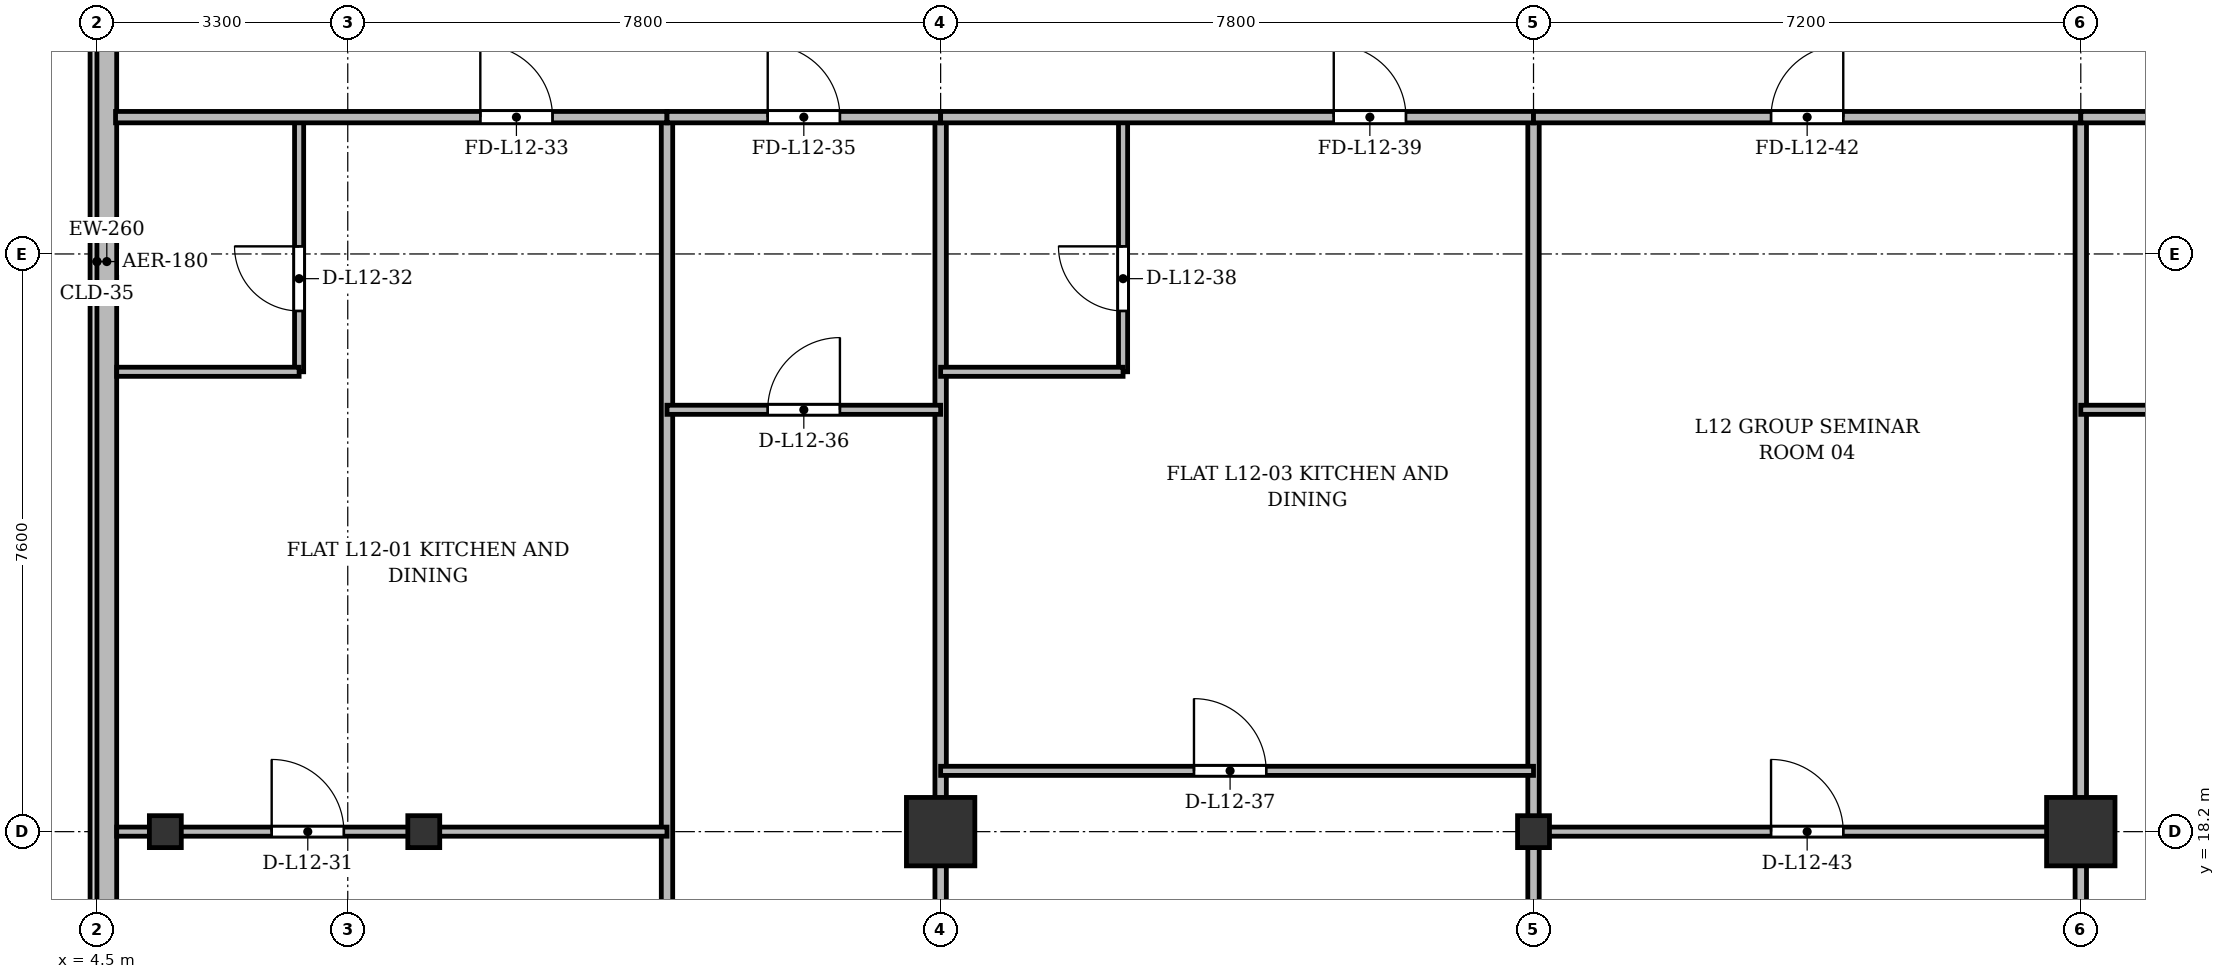
"""IFC4 building model, lengths in metres.
Left out: names, types, materials, properties, quantities, classifications, styles, units other than length and angle.
Written with IfcOpenShell. Run it as: python <this file> out.ifc"""

import sys

from ifc_helpers import new_model, si_unit, direction, frame, frame_2d, origin, origin_2d, place, context, subcontext, project, spatial, rectangle, i_section, extrude, source, transform, mapped, element, fill, save


model = new_model("IFC4")
c1 = context("Model", 3, precision=1e-05, world=origin(), true_north=direction((0.0, 1.0)))
c2 = subcontext(c1, "Body", "Model", "MODEL_VIEW")
j1 = project(units=[si_unit("LENGTHUNIT", "METRE"), si_unit("PLANEANGLEUNIT", "RADIAN")], contexts=[c1])
p1 = place(None, origin())
s1 = spatial("IfcSite", under=j1, at=p1, CompositionType="ELEMENT")
p2 = place(p1, origin())
s2 = spatial("IfcBuilding", under=s1, at=p2, CompositionType="ELEMENT")
p3 = place(p2, frame((0.0, 0.0, 48.7)))
s3 = spatial("IfcBuildingStorey", under=s2, at=p3, CompositionType="ELEMENT", Elevation=48.7)
m1 = source(origin(), c2, "Body", "SweptSolid", [
    extrude(i_section(OverallWidth=0.42, OverallDepth=0.42, WebThickness=0.026, FlangeThickness=0.04, at=origin_2d()), origin(), (0.0, 0.0, 1.0), 3.6),
])
for number, where, z_axis, x_axis in (
    (1, (5.4, 18.2, 0.0), (0.0, 0.0, 1.0), (1.0, 0.0, 0.0)),
    (2, (8.8, 18.2, 0.0), (0.0, 0.0, 1.0), (1.0, 0.0, 0.0)),
):
    element("IfcColumn", number, at=place(p3, frame(where, z_axis=z_axis, x_axis=x_axis)), inside=s3, PredefinedType="COLUMN", context=c2, shape_type="MappedRepresentation", body=[
        mapped(m1, transform((0.0, 0.0, 0.0), x_axis=(1.0, 0.0, 0.0), y_axis=(0.0, 1.0, 0.0), z_axis=(0.0, 0.0, 1.0), scale=1.0)),
    ])
m2 = source(origin(), c2, "Body", "SweptSolid", [
    extrude(rectangle(XDim=0.9, YDim=0.9, at=origin_2d()), origin(), (0.0, 0.0, 1.0), 3.6),
])
p4 = place(p3, frame((15.6, 18.2, 0.0), z_axis=(0.0, 0.0, 1.0), x_axis=(1.0, 0.0, 0.0)))
e3 = element("IfcColumn", 3, at=p4, inside=s3, PredefinedType="COLUMN", context=c2, shape_type="MappedRepresentation", body=[
    mapped(m2, transform((0.0, 0.0, 0.0), x_axis=(1.0, 0.0, 0.0), y_axis=(0.0, 1.0, 0.0), z_axis=(0.0, 0.0, 1.0), scale=1.0)),
])
p5 = place(p3, frame((23.4, 18.2, 0.0), z_axis=(0.0, 0.0, 1.0), x_axis=(1.0, 0.0, 0.0)))
e4 = element("IfcColumn", 4, at=p5, inside=s3, PredefinedType="COLUMN", context=c2, shape_type="MappedRepresentation", body=[
    mapped(m1, transform((0.0, 0.0, 0.0), x_axis=(1.0, 0.0, 0.0), y_axis=(0.0, 1.0, 0.0), z_axis=(0.0, 0.0, 1.0), scale=1.0)),
])
p6 = place(p3, frame((30.6, 18.2, 0.0), z_axis=(0.0, 0.0, 1.0), x_axis=(1.0, 0.0, 0.0)))
e5 = element("IfcColumn", 5, at=p6, inside=s3, PredefinedType="COLUMN", context=c2, shape_type="MappedRepresentation", body=[
    mapped(m2, transform((0.0, 0.0, 0.0), x_axis=(1.0, 0.0, 0.0), y_axis=(0.0, 1.0, 0.0), z_axis=(0.0, 0.0, 1.0), scale=1.0)),
])
p7 = place(p3, frame((4.63, 5.9, 0.0), z_axis=(0.0, 0.0, 1.0), x_axis=(0.0, 1.0, 0.0)))
e6 = element("IfcWall", 6, at=p7, inside=s3, PredefinedType="SOLIDWALL", context=c2, shape_type="SweptSolid", body=[
    extrude(rectangle(XDim=39.6, YDim=0.26, at=frame_2d((19.8, 0.0))), origin(), (0.0, 0.0, 1.0), 3.34),
])
p8 = place(p7, frame((1.45, 0.0, 0.92)))
e7 = element("IfcOpeningElement", 7, at=p8, cuts=e6, PredefinedType="OPENING", context=c2, shape_type="SweptSolid", body=[
    extrude(rectangle(XDim=1.2, YDim=1.65, at=frame_2d((0.6, 0.825))), frame((0.0, 0.14, 0.0), z_axis=(0.0, -1.0, 0.0), x_axis=(1.0, 0.0, 0.0)), (0.0, 0.0, 1.0), 0.28),
])
p9 = place(p7, frame((4.2, 0.0, 0.92)))
e8 = element("IfcOpeningElement", 8, at=p9, cuts=e6, PredefinedType="OPENING", context=c2, shape_type="SweptSolid", body=[
    extrude(rectangle(XDim=2.6, YDim=1.9, at=frame_2d((1.3, 0.95))), frame((0.0, 0.14, 0.0), z_axis=(0.0, -1.0, 0.0), x_axis=(1.0, 0.0, 0.0)), (0.0, 0.0, 1.0), 0.28),
])
p10 = place(p7, frame((8.4, 0.0, 0.92)))
e9 = element("IfcOpeningElement", 9, at=p10, cuts=e6, PredefinedType="OPENING", context=c2, shape_type="SweptSolid", body=[
    extrude(rectangle(XDim=2.6, YDim=1.9, at=frame_2d((1.3, 0.95))), frame((0.0, 0.14, 0.0), z_axis=(0.0, -1.0, 0.0), x_axis=(1.0, 0.0, 0.0)), (0.0, 0.0, 1.0), 0.28),
])
p11 = place(p7, frame((29.6, 0.0, 0.92)))
e10 = element("IfcOpeningElement", 10, at=p11, cuts=e6, PredefinedType="OPENING", context=c2, shape_type="SweptSolid", body=[
    extrude(rectangle(XDim=2.6, YDim=1.9, at=frame_2d((1.3, 0.95))), frame((0.0, 0.14, 0.0), z_axis=(0.0, -1.0, 0.0), x_axis=(1.0, 0.0, 0.0)), (0.0, 0.0, 1.0), 0.28),
])
p12 = place(p7, frame((33.9, 0.0, 0.92)))
e11 = element("IfcOpeningElement", 11, at=p12, cuts=e6, PredefinedType="OPENING", context=c2, shape_type="SweptSolid", body=[
    extrude(rectangle(XDim=1.2, YDim=1.65, at=frame_2d((0.6, 0.825))), frame((0.0, 0.14, 0.0), z_axis=(0.0, -1.0, 0.0), x_axis=(1.0, 0.0, 0.0)), (0.0, 0.0, 1.0), 0.28),
])
p13 = place(p7, frame((37.25, 0.0, 0.92)))
e12 = element("IfcOpeningElement", 12, at=p13, cuts=e6, PredefinedType="OPENING", context=c2, shape_type="SweptSolid", body=[
    extrude(rectangle(XDim=1.2, YDim=1.65, at=frame_2d((0.6, 0.825))), frame((0.0, 0.14, 0.0), z_axis=(0.0, -1.0, 0.0), x_axis=(1.0, 0.0, 0.0)), (0.0, 0.0, 1.0), 0.28),
])
p14 = place(p3, frame((12.0, 3.145, 0.0), z_axis=(0.0, 0.0, 1.0), x_axis=(0.0, 1.0, 0.0)))
e13 = element("IfcWall", 13, at=p14, inside=s3, PredefinedType="PARTITIONING", context=c2, shape_type="SweptSolid", body=[
    extrude(rectangle(XDim=24.455, YDim=0.15, at=frame_2d((12.228, 0.0))), origin(), (0.0, 0.0, 1.0), 2.69),
])
for number, where, z_axis, x_axis in (
    (14, (15.6, 3.145, 0.0), (0.0, 0.0, 1.0), (0.0, 1.0, 0.0)),
    (15, (23.4, 3.145, 0.0), (0.0, 0.0, 1.0), (0.0, 1.0, 0.0)),
    (16, (30.6, 3.145, 0.0), (0.0, 0.0, 1.0), (0.0, 1.0, 0.0)),
):
    element("IfcWall", number, at=place(p3, frame(where, z_axis=z_axis, x_axis=x_axis)), inside=s3, PredefinedType="PARTITIONING", context=c2, shape_type="SweptSolid", body=[
        extrude(rectangle(XDim=24.455, YDim=0.15, at=frame_2d((12.228, 0.0))), origin(), (0.0, 0.0, 1.0), 2.752),
    ])
p15 = place(p3, frame((4.76, 18.2, 0.0), z_axis=(0.0, 0.0, 1.0), x_axis=(1.0, 0.0, 0.0)))
e17 = element("IfcWall", 17, at=p15, inside=s3, PredefinedType="PARTITIONING", context=c2, shape_type="SweptSolid", body=[
    extrude(rectangle(XDim=7.24, YDim=0.12, at=frame_2d((3.62, 0.0))), origin(), (0.0, 0.0, 1.0), 2.69),
])
p16 = place(p15, frame((2.039, 0.0, 0.0)))
e18 = element("IfcOpeningElement", 18, at=p16, cuts=e17, PredefinedType="OPENING", context=c2, shape_type="SweptSolid", body=[
    extrude(rectangle(XDim=0.95, YDim=2.15, at=frame_2d((0.475, 1.075))), frame((0.0, 0.07, 0.0), z_axis=(0.0, -1.0, 0.0), x_axis=(1.0, 0.0, 0.0)), (0.0, 0.0, 1.0), 0.14),
])
p17 = place(p3, frame((7.16, 24.25, 0.0), z_axis=(0.0, 0.0, 1.0), x_axis=(0.0, 1.0, 0.0)))
e19 = element("IfcWall", 19, at=p17, inside=s3, PredefinedType="PARTITIONING", context=c2, shape_type="SweptSolid", body=[
    extrude(rectangle(XDim=3.35, YDim=0.12, at=frame_2d((1.675, 0.0))), origin(), (0.0, 0.0, 1.0), 2.94),
])
p18 = place(p17, frame((0.8, 0.0, 0.0)))
e20 = element("IfcOpeningElement", 20, at=p18, cuts=e19, PredefinedType="OPENING", context=c2, shape_type="SweptSolid", body=[
    extrude(rectangle(XDim=0.85, YDim=2.1, at=frame_2d((0.425, 1.05))), frame((0.0, 0.07, 0.0), z_axis=(0.0, -1.0, 0.0), x_axis=(1.0, 0.0, 0.0)), (0.0, 0.0, 1.0), 0.14),
])
p19 = place(p3, frame((4.76, 24.25, 0.0), z_axis=(0.0, 0.0, 1.0), x_axis=(1.0, 0.0, 0.0)))
e21 = element("IfcWall", 21, at=p19, inside=s3, PredefinedType="PARTITIONING", context=c2, shape_type="SweptSolid", body=[
    extrude(rectangle(XDim=2.4, YDim=0.12, at=frame_2d((1.2, 0.0))), origin(), (0.0, 0.0, 1.0), 2.752),
])
p20 = place(p3, frame((4.745, 27.6, 0.0), z_axis=(0.0, 0.0, 1.0), x_axis=(1.0, 0.0, 0.0)))
e22 = element("IfcWall", 22, at=p20, inside=s3, PredefinedType="PARTITIONING", context=c2, shape_type="SweptSolid", body=[
    extrude(rectangle(XDim=7.255, YDim=0.15, at=frame_2d((3.627, 0.0))), origin(), (0.0, 0.0, 1.0), 2.752),
])
p21 = place(p20, frame((4.799, 0.0, 0.0)))
e23 = element("IfcOpeningElement", 23, at=p21, cuts=e22, PredefinedType="OPENING", context=c2, shape_type="SweptSolid", body=[
    extrude(rectangle(XDim=0.95, YDim=2.15, at=frame_2d((0.475, 1.075))), frame((0.0, 0.085, 0.0), z_axis=(0.0, -1.0, 0.0), x_axis=(1.0, 0.0, 0.0)), (0.0, 0.0, 1.0), 0.17),
])
p22 = place(p3, frame((12.0, 27.6, 0.0), z_axis=(0.0, 0.0, 1.0), x_axis=(1.0, 0.0, 0.0)))
e24 = element("IfcWall", 24, at=p22, inside=s3, PredefinedType="PARTITIONING", context=c2, shape_type="SweptSolid", body=[
    extrude(rectangle(XDim=3.6, YDim=0.15, at=frame_2d((1.8, 0.0))), origin(), (0.0, 0.0, 1.0), 2.752),
])
p23 = place(p22, frame((1.325, 0.0, 0.0)))
e25 = element("IfcOpeningElement", 25, at=p23, cuts=e24, PredefinedType="OPENING", context=c2, shape_type="SweptSolid", body=[
    extrude(rectangle(XDim=0.95, YDim=2.15, at=frame_2d((0.475, 1.075))), frame((0.0, 0.085, 0.0), z_axis=(0.0, -1.0, 0.0), x_axis=(1.0, 0.0, 0.0)), (0.0, 0.0, 1.0), 0.17),
])
p24 = place(p3, frame((12.0, 23.75, 0.0), z_axis=(0.0, 0.0, 1.0), x_axis=(1.0, 0.0, 0.0)))
e26 = element("IfcWall", 26, at=p24, inside=s3, PredefinedType="PARTITIONING", context=c2, shape_type="SweptSolid", body=[
    extrude(rectangle(XDim=3.6, YDim=0.12, at=frame_2d((1.8, 0.0))), origin(), (0.0, 0.0, 1.0), 2.752),
])
p25 = place(p24, frame((1.325, 0.0, 0.0)))
e27 = element("IfcOpeningElement", 27, at=p25, cuts=e26, PredefinedType="OPENING", context=c2, shape_type="SweptSolid", body=[
    extrude(rectangle(XDim=0.95, YDim=2.15, at=frame_2d((0.475, 1.075))), frame((0.0, 0.07, 0.0), z_axis=(0.0, -1.0, 0.0), x_axis=(1.0, 0.0, 0.0)), (0.0, 0.0, 1.0), 0.14),
])
p26 = place(p3, frame((15.6, 19.0, 0.0), z_axis=(0.0, 0.0, 1.0), x_axis=(1.0, 0.0, 0.0)))
e28 = element("IfcWall", 28, at=p26, inside=s3, PredefinedType="PARTITIONING", context=c2, shape_type="SweptSolid", body=[
    extrude(rectangle(XDim=7.8, YDim=0.12, at=frame_2d((3.9, 0.0))), origin(), (0.0, 0.0, 1.0), 2.752),
])
p27 = place(p26, frame((3.333, 0.0, 0.0)))
e29 = element("IfcOpeningElement", 29, at=p27, cuts=e28, PredefinedType="OPENING", context=c2, shape_type="SweptSolid", body=[
    extrude(rectangle(XDim=0.95, YDim=2.15, at=frame_2d((0.475, 1.075))), frame((0.0, 0.07, 0.0), z_axis=(0.0, -1.0, 0.0), x_axis=(1.0, 0.0, 0.0)), (0.0, 0.0, 1.0), 0.14),
])
p28 = place(p3, frame((18.0, 24.25, 0.0), z_axis=(0.0, 0.0, 1.0), x_axis=(0.0, 1.0, 0.0)))
e30 = element("IfcWall", 30, at=p28, inside=s3, PredefinedType="PARTITIONING", context=c2, shape_type="SweptSolid", body=[
    extrude(rectangle(XDim=3.35, YDim=0.12, at=frame_2d((1.675, 0.0))), origin(), (0.0, 0.0, 1.0), 2.94),
])
p29 = place(p28, frame((0.8, 0.0, 0.0)))
e31 = element("IfcOpeningElement", 31, at=p29, cuts=e30, PredefinedType="OPENING", context=c2, shape_type="SweptSolid", body=[
    extrude(rectangle(XDim=0.85, YDim=2.1, at=frame_2d((0.425, 1.05))), frame((0.0, 0.07, 0.0), z_axis=(0.0, -1.0, 0.0), x_axis=(1.0, 0.0, 0.0)), (0.0, 0.0, 1.0), 0.14),
])
p30 = place(p3, frame((15.6, 24.25, 0.0), z_axis=(0.0, 0.0, 1.0), x_axis=(1.0, 0.0, 0.0)))
e32 = element("IfcWall", 32, at=p30, inside=s3, PredefinedType="PARTITIONING", context=c2, shape_type="SweptSolid", body=[
    extrude(rectangle(XDim=2.4, YDim=0.12, at=frame_2d((1.2, 0.0))), origin(), (0.0, 0.0, 1.0), 2.752),
])
p31 = place(p3, frame((15.6, 27.6, 0.0), z_axis=(0.0, 0.0, 1.0), x_axis=(1.0, 0.0, 0.0)))
e33 = element("IfcWall", 33, at=p31, inside=s3, PredefinedType="PARTITIONING", context=c2, shape_type="SweptSolid", body=[
    extrude(rectangle(XDim=7.8, YDim=0.15, at=frame_2d((3.9, 0.0))), origin(), (0.0, 0.0, 1.0), 2.752),
])
p32 = place(p31, frame((5.172, 0.0, 0.0)))
e34 = element("IfcOpeningElement", 34, at=p32, cuts=e33, PredefinedType="OPENING", context=c2, shape_type="SweptSolid", body=[
    extrude(rectangle(XDim=0.95, YDim=2.15, at=frame_2d((0.475, 1.075))), frame((0.0, 0.085, 0.0), z_axis=(0.0, -1.0, 0.0), x_axis=(1.0, 0.0, 0.0)), (0.0, 0.0, 1.0), 0.17),
])
p33 = place(p3, frame((23.4, 27.6, 0.0), z_axis=(0.0, 0.0, 1.0), x_axis=(1.0, 0.0, 0.0)))
e35 = element("IfcWall", 35, at=p33, inside=s3, PredefinedType="PARTITIONING", context=c2, shape_type="SweptSolid", body=[
    extrude(rectangle(XDim=7.2, YDim=0.15, at=frame_2d((3.6, 0.0))), origin(), (0.0, 0.0, 1.0), 2.752),
])
p34 = place(p33, frame((3.125, 0.0, 0.0)))
e36 = element("IfcOpeningElement", 36, at=p34, cuts=e35, PredefinedType="OPENING", context=c2, shape_type="SweptSolid", body=[
    extrude(rectangle(XDim=0.95, YDim=2.15, at=frame_2d((0.475, 1.075))), frame((0.0, 0.085, 0.0), z_axis=(0.0, -1.0, 0.0), x_axis=(1.0, 0.0, 0.0)), (0.0, 0.0, 1.0), 0.17),
])
p35 = place(p3, frame((23.4, 18.2, 0.0), z_axis=(0.0, 0.0, 1.0), x_axis=(1.0, 0.0, 0.0)))
e37 = element("IfcWall", 37, at=p35, inside=s3, PredefinedType="PARTITIONING", context=c2, shape_type="SweptSolid", body=[
    extrude(rectangle(XDim=7.2, YDim=0.12, at=frame_2d((3.6, 0.0))), origin(), (0.0, 0.0, 1.0), 2.69),
])
p36 = place(p35, frame((3.125, 0.0, 0.0)))
e38 = element("IfcOpeningElement", 38, at=p36, cuts=e37, PredefinedType="OPENING", context=c2, shape_type="SweptSolid", body=[
    extrude(rectangle(XDim=0.95, YDim=2.15, at=frame_2d((0.475, 1.075))), frame((0.0, 0.07, 0.0), z_axis=(0.0, -1.0, 0.0), x_axis=(1.0, 0.0, 0.0)), (0.0, 0.0, 1.0), 0.14),
])
p37 = place(p3, frame((30.6, 27.6, 0.0), z_axis=(0.0, 0.0, 1.0), x_axis=(1.0, 0.0, 0.0)))
e39 = element("IfcWall", 39, at=p37, inside=s3, PredefinedType="PARTITIONING", context=c2, shape_type="SweptSolid", body=[
    extrude(rectangle(XDim=8.4, YDim=0.15, at=frame_2d((4.2, 0.0))), origin(), (0.0, 0.0, 1.0), 2.752),
])
p38 = place(p37, frame((3.635, 0.0, 0.0)))
e40 = element("IfcOpeningElement", 40, at=p38, cuts=e39, PredefinedType="OPENING", context=c2, shape_type="SweptSolid", body=[
    extrude(rectangle(XDim=0.95, YDim=2.15, at=frame_2d((0.475, 1.075))), frame((0.0, 0.085, 0.0), z_axis=(0.0, -1.0, 0.0), x_axis=(1.0, 0.0, 0.0)), (0.0, 0.0, 1.0), 0.17),
])
p39 = place(p3, frame((30.6, 23.75, 0.0), z_axis=(0.0, 0.0, 1.0), x_axis=(1.0, 0.0, 0.0)))
e41 = element("IfcWall", 41, at=p39, inside=s3, PredefinedType="PARTITIONING", context=c2, shape_type="SweptSolid", body=[
    extrude(rectangle(XDim=8.4, YDim=0.12, at=frame_2d((4.2, 0.0))), origin(), (0.0, 0.0, 1.0), 2.752),
])
p40 = place(p39, frame((3.635, 0.0, 0.0)))
e42 = element("IfcOpeningElement", 42, at=p40, cuts=e41, PredefinedType="OPENING", context=c2, shape_type="SweptSolid", body=[
    extrude(rectangle(XDim=0.95, YDim=2.15, at=frame_2d((0.475, 1.075))), frame((0.0, 0.07, 0.0), z_axis=(0.0, -1.0, 0.0), x_axis=(1.0, 0.0, 0.0)), (0.0, 0.0, 1.0), 0.14),
])
m3 = source(origin(), c2, "Body", "SweptSolid", [
    extrude(rectangle(XDim=0.95, YDim=2.15, at=frame_2d((0.475, 1.075))), frame((0.0, 0.025, 0.0), z_axis=(0.0, -1.0, 0.0), x_axis=(1.0, 0.0, 0.0)), (0.0, 0.0, 1.0), 0.05),
])
p41 = place(p16, origin())
e43 = element("IfcDoor", 43, at=p41, inside=s3, OperationType="SINGLE_SWING_LEFT", PredefinedType="DOOR", context=c2, shape_type="MappedRepresentation", body=[
    mapped(m3, transform((0.0, 0.0, 0.0), x_axis=(1.0, 0.0, 0.0), y_axis=(0.0, 1.0, 0.0), z_axis=(0.0, 0.0, 1.0), scale=1.0)),
])
fill(e18, e43)
m4 = source(origin(), c2, "Body", "SweptSolid", [
    extrude(rectangle(XDim=0.85, YDim=2.1, at=frame_2d((0.425, 1.05))), frame((0.0, 0.025, 0.0), z_axis=(0.0, -1.0, 0.0), x_axis=(1.0, 0.0, 0.0)), (0.0, 0.0, 1.0), 0.05),
])
p42 = place(p18, origin())
e44 = element("IfcDoor", 44, at=p42, inside=s3, OperationType="SINGLE_SWING_RIGHT", PredefinedType="DOOR", context=c2, shape_type="MappedRepresentation", body=[
    mapped(m4, transform((0.0, 0.0, 0.0), x_axis=(1.0, 0.0, 0.0), y_axis=(0.0, 1.0, 0.0), z_axis=(0.0, 0.0, 1.0), scale=1.0)),
])
fill(e20, e44)
p43 = place(p21, origin())
e45 = element("IfcDoor", 45, at=p43, inside=s3, OperationType="SINGLE_SWING_LEFT", PredefinedType="DOOR", context=c2, shape_type="MappedRepresentation", body=[
    mapped(m3, transform((0.0, 0.0, 0.0), x_axis=(1.0, 0.0, 0.0), y_axis=(0.0, 1.0, 0.0), z_axis=(0.0, 0.0, 1.0), scale=1.0)),
])
fill(e23, e45)
p44 = place(p23, origin())
e46 = element("IfcDoor", 46, at=p44, inside=s3, OperationType="SINGLE_SWING_LEFT", PredefinedType="DOOR", context=c2, shape_type="MappedRepresentation", body=[
    mapped(m3, transform((0.0, 0.0, 0.0), x_axis=(1.0, 0.0, 0.0), y_axis=(0.0, 1.0, 0.0), z_axis=(0.0, 0.0, 1.0), scale=1.0)),
])
fill(e25, e46)
p45 = place(p25, origin())
e47 = element("IfcDoor", 47, at=p45, inside=s3, OperationType="SINGLE_SWING_RIGHT", PredefinedType="DOOR", context=c2, shape_type="MappedRepresentation", body=[
    mapped(m3, transform((0.0, 0.0, 0.0), x_axis=(1.0, 0.0, 0.0), y_axis=(0.0, 1.0, 0.0), z_axis=(0.0, 0.0, 1.0), scale=1.0)),
])
fill(e27, e47)
p46 = place(p27, origin())
e48 = element("IfcDoor", 48, at=p46, inside=s3, OperationType="SINGLE_SWING_LEFT", PredefinedType="DOOR", context=c2, shape_type="MappedRepresentation", body=[
    mapped(m3, transform((0.0, 0.0, 0.0), x_axis=(1.0, 0.0, 0.0), y_axis=(0.0, 1.0, 0.0), z_axis=(0.0, 0.0, 1.0), scale=1.0)),
])
fill(e29, e48)
p47 = place(p29, origin())
e49 = element("IfcDoor", 49, at=p47, inside=s3, OperationType="SINGLE_SWING_RIGHT", PredefinedType="DOOR", context=c2, shape_type="MappedRepresentation", body=[
    mapped(m4, transform((0.0, 0.0, 0.0), x_axis=(1.0, 0.0, 0.0), y_axis=(0.0, 1.0, 0.0), z_axis=(0.0, 0.0, 1.0), scale=1.0)),
])
fill(e31, e49)
p48 = place(p32, origin())
e50 = element("IfcDoor", 50, at=p48, inside=s3, OperationType="SINGLE_SWING_LEFT", PredefinedType="DOOR", context=c2, shape_type="MappedRepresentation", body=[
    mapped(m3, transform((0.0, 0.0, 0.0), x_axis=(1.0, 0.0, 0.0), y_axis=(0.0, 1.0, 0.0), z_axis=(0.0, 0.0, 1.0), scale=1.0)),
])
fill(e34, e50)
p49 = place(p34, origin())
e51 = element("IfcDoor", 51, at=p49, inside=s3, OperationType="SINGLE_SWING_RIGHT", PredefinedType="DOOR", context=c2, shape_type="MappedRepresentation", body=[
    mapped(m3, transform((0.0, 0.0, 0.0), x_axis=(1.0, 0.0, 0.0), y_axis=(0.0, 1.0, 0.0), z_axis=(0.0, 0.0, 1.0), scale=1.0)),
])
fill(e36, e51)
p50 = place(p36, origin())
e52 = element("IfcDoor", 52, at=p50, inside=s3, OperationType="SINGLE_SWING_LEFT", PredefinedType="DOOR", context=c2, shape_type="MappedRepresentation", body=[
    mapped(m3, transform((0.0, 0.0, 0.0), x_axis=(1.0, 0.0, 0.0), y_axis=(0.0, 1.0, 0.0), z_axis=(0.0, 0.0, 1.0), scale=1.0)),
])
fill(e38, e52)
save(model, sys.argv[1])
